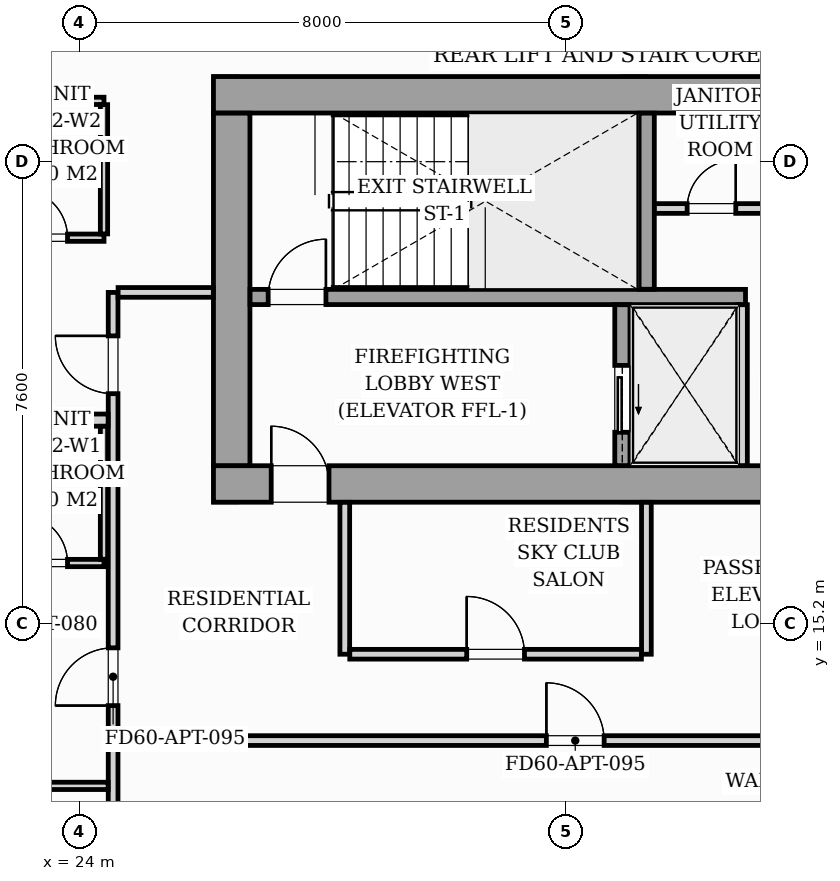
"""IFC4 building model, lengths in metres.
Left out: names, types, materials, properties, quantities, classifications, styles, units other than length and angle.
Written with IfcOpenShell. Run it as: python <this file> out.ifc"""

import sys

from ifc_helpers import new_model, si_unit, direction, frame, frame_2d, origin, origin_2d, place, context, subcontext, project, spatial, rectangle, i_section, extrude, source, transform, mapped, element, fill, save


model = new_model("IFC4")
c1 = context("Model", 3, precision=1e-05, world=origin(), true_north=direction((0.0, 1.0)))
c2 = subcontext(c1, "Body", "Model", "MODEL_VIEW")
j1 = project(units=[si_unit("LENGTHUNIT", "METRE"), si_unit("PLANEANGLEUNIT", "RADIAN")], contexts=[c1])
p1 = place(None, origin())
s1 = spatial("IfcSite", under=j1, at=p1, CompositionType="ELEMENT")
p2 = place(p1, origin())
s2 = spatial("IfcBuilding", under=s1, at=p2, CompositionType="ELEMENT")
p3 = place(p2, frame((0.0, 0.0, 249.6)))
s3 = spatial("IfcBuildingStorey", under=s2, at=p3, CompositionType="ELEMENT", Elevation=249.6)
m1 = source(origin(), c2, "Body", "SweptSolid", [
    extrude(i_section(OverallWidth=0.409, OverallDepth=0.425, WebThickness=0.033, FlangeThickness=0.052, FilletRadius=0.018, at=origin_2d()), origin(), (0.0, 0.0, 1.0), 3.296),
])
for number, where, z_axis, x_axis in (
    (1, (26.4, 17.4, 0.002), (0.0, 0.0, 1.0), (1.0, 0.0, 0.0)),
    (2, (33.12, 17.4, 0.002), (0.0, 0.0, 1.0), (1.0, 0.0, 0.0)),
    (3, (26.4, 24.0, 0.002), (0.0, 0.0, 1.0), (1.0, 0.0, 0.0)),
    (4, (33.12, 24.0, 0.002), (0.0, 0.0, 1.0), (1.0, 0.0, 0.0)),
):
    element("IfcColumn", number, at=place(p3, frame(where, z_axis=z_axis, x_axis=x_axis)), inside=s3, PredefinedType="PILASTER", context=c2, shape_type="MappedRepresentation", body=[
        mapped(m1, transform((0.0, 0.0, 0.0), scale=1.0)),
    ])
p4 = place(p3, frame((26.2, 17.5, 0.0), z_axis=(0.0, 0.0, 1.0), x_axis=(1.0, 0.0, 0.0)))
e5 = element("IfcWall", 5, at=p4, inside=s3, PredefinedType="SHEAR", context=c2, shape_type="SweptSolid", body=[
    extrude(rectangle(XDim=19.6, YDim=0.6, at=frame_2d((9.8, 0.0))), origin(), (0.0, 0.0, 1.0), 3.3),
])
p5 = place(p4, frame((0.95, 0.0, 0.0)))
e6 = element("IfcOpeningElement", 6, at=p5, cuts=e5, PredefinedType="OPENING", context=c2, shape_type="SweptSolid", body=[
    extrude(rectangle(XDim=0.95, YDim=2.06, at=frame_2d((0.475, 1.03))), frame((0.0, 0.31, 0.0), z_axis=(0.0, -1.0, 0.0), x_axis=(1.0, 0.0, 0.0)), (0.0, 0.0, 1.0), 0.62),
])
p6 = place(p4, frame((9.38, 0.0, 0.0)))
e7 = element("IfcOpeningElement", 7, at=p6, cuts=e5, PredefinedType="OPENING", context=c2, shape_type="SweptSolid", body=[
    extrude(rectangle(XDim=0.85, YDim=2.0, at=frame_2d((0.425, 1.0))), frame((0.0, 0.31, 0.0), z_axis=(0.0, -1.0, 0.0), x_axis=(1.0, 0.0, 0.0)), (0.0, 0.0, 1.0), 0.62),
])
p7 = place(p4, frame((17.55, 0.0, 0.0)))
e8 = element("IfcOpeningElement", 8, at=p7, cuts=e5, PredefinedType="OPENING", context=c2, shape_type="SweptSolid", body=[
    extrude(rectangle(XDim=0.95, YDim=2.06, at=frame_2d((0.475, 1.03))), frame((0.0, 0.31, 0.0), z_axis=(0.0, -1.0, 0.0), x_axis=(1.0, 0.0, 0.0)), (0.0, 0.0, 1.0), 0.62),
])
p8 = place(p3, frame((26.2, 23.9, 0.0), z_axis=(0.0, 0.0, 1.0), x_axis=(1.0, 0.0, 0.0)))
e9 = element("IfcWall", 9, at=p8, inside=s3, PredefinedType="SHEAR", context=c2, shape_type="SweptSolid", body=[
    extrude(rectangle(XDim=19.6, YDim=0.6, at=frame_2d((9.8, 0.0))), origin(), (0.0, 0.0, 1.0), 3.3),
])
p9 = place(p3, frame((26.5, 17.802, 0.0), z_axis=(0.0, 0.0, 1.0), x_axis=(0.0, 1.0, 0.0)))
e10 = element("IfcWall", 10, at=p9, inside=s3, PredefinedType="SHEAR", context=c2, shape_type="SweptSolid", body=[
    extrude(rectangle(XDim=5.796, YDim=0.6, at=frame_2d((2.898, 0.0))), origin(), (0.0, 0.0, 1.0), 3.3),
])
p10 = place(p3, frame((26.802, 20.575, 0.0), z_axis=(0.0, 0.0, 1.0), x_axis=(1.0, 0.0, 0.0)))
e11 = element("IfcWall", 11, at=p10, inside=s3, PredefinedType="SOLIDWALL", context=c2, shape_type="SweptSolid", body=[
    extrude(rectangle(XDim=8.148, YDim=0.25, at=frame_2d((4.074, 0.0))), origin(), (0.0, 0.0, 1.0), 3.3),
])
p11 = place(p10, frame((0.298, 0.0, 0.0)))
e12 = element("IfcOpeningElement", 12, at=p11, cuts=e11, PredefinedType="OPENING", context=c2, shape_type="SweptSolid", body=[
    extrude(rectangle(XDim=0.95, YDim=2.06, at=frame_2d((0.475, 1.03))), frame((0.0, 0.135, 0.0), z_axis=(0.0, -1.0, 0.0), x_axis=(1.0, 0.0, 0.0)), (0.0, 0.0, 1.0), 0.27),
])
p12 = place(p3, frame((33.325, 20.702, 0.0), z_axis=(0.0, 0.0, 1.0), x_axis=(0.0, 1.0, 0.0)))
e13 = element("IfcWall", 13, at=p12, inside=s3, PredefinedType="SOLIDWALL", context=c2, shape_type="SweptSolid", body=[
    extrude(rectangle(XDim=2.896, YDim=0.25, at=frame_2d((1.448, 0.0))), origin(), (0.0, 0.0, 1.0), 3.3),
])
p13 = place(p3, frame((32.925, 17.802, 0.0), z_axis=(0.0, 0.0, 1.0), x_axis=(0.0, 1.0, 0.0)))
e14 = element("IfcWall", 14, at=p13, inside=s3, PredefinedType="SOLIDWALL", context=c2, shape_type="SweptSolid", body=[
    extrude(rectangle(XDim=2.646, YDim=0.25, at=frame_2d((1.323, 0.0))), origin(), (0.0, 0.0, 1.0), 3.3),
])
p14 = place(p13, frame((0.548, 0.0, 0.0)))
e15 = element("IfcOpeningElement", 15, at=p14, cuts=e14, PredefinedType="OPENING", context=c2, shape_type="SweptSolid", body=[
    extrude(rectangle(XDim=1.1, YDim=2.08, at=frame_2d((0.55, 1.04))), frame((0.0, 0.135, 0.0), z_axis=(0.0, -1.0, 0.0), x_axis=(1.0, 0.0, 0.0)), (0.0, 0.0, 1.0), 0.27),
])
p15 = place(p3, frame((34.9, 17.802, 0.0), z_axis=(0.0, 0.0, 1.0), x_axis=(0.0, 1.0, 0.0)))
e16 = element("IfcWall", 16, at=p15, inside=s3, PredefinedType="PARTITIONING", context=c2, shape_type="SweptSolid", body=[
    extrude(rectangle(XDim=2.646, YDim=0.16, at=frame_2d((1.323, 0.0))), origin(), (0.0, 0.0, 1.0), 3.04),
])
p16 = place(p3, frame((33.452, 22.03, 0.0), z_axis=(0.0, 0.0, 1.0), x_axis=(1.0, 0.0, 0.0)))
e17 = element("IfcWall", 17, at=p16, inside=s3, PredefinedType="PARTITIONING", context=c2, shape_type="SweptSolid", body=[
    extrude(rectangle(XDim=5.096, YDim=0.16, at=frame_2d((2.548, 0.0))), origin(), (0.0, 0.0, 1.0), 3.04),
])
p17 = place(p16, frame((0.538, 0.0, 0.0)))
e18 = element("IfcOpeningElement", 18, at=p17, cuts=e17, PredefinedType="OPENING", context=c2, shape_type="SweptSolid", body=[
    extrude(rectangle(XDim=0.8, YDim=2.05, at=frame_2d((0.4, 1.025))), frame((0.0, 0.09, 0.0), z_axis=(0.0, -1.0, 0.0), x_axis=(1.0, 0.0, 0.0)), (0.0, 0.0, 1.0), 0.18),
])
p18 = place(p16, frame((3.158, 0.0, 0.0)))
e19 = element("IfcOpeningElement", 19, at=p18, cuts=e17, PredefinedType="OPENING", context=c2, shape_type="SweptSolid", body=[
    extrude(rectangle(XDim=0.8, YDim=2.05, at=frame_2d((0.4, 1.025))), frame((0.0, 0.09, 0.0), z_axis=(0.0, -1.0, 0.0), x_axis=(1.0, 0.0, 0.0)), (0.0, 0.0, 1.0), 0.18),
])
p19 = place(p3, frame((24.55, 13.28, 0.0), z_axis=(0.0, 0.0, 1.0), x_axis=(1.0, 0.0, 0.0)))
e20 = element("IfcWall", 20, at=p19, inside=s3, PredefinedType="PARTITIONING", context=c2, shape_type="SweptSolid", body=[
    extrude(rectangle(XDim=22.9, YDim=0.16, at=frame_2d((11.45, 0.0))), origin(), (0.0, 0.0, 1.0), 2.596),
])
p20 = place(p19, frame((7.125, 0.0, 0.0)))
e21 = element("IfcOpeningElement", 21, at=p20, cuts=e20, PredefinedType="OPENING", context=c2, shape_type="SweptSolid", body=[
    extrude(rectangle(XDim=0.95, YDim=2.06, at=frame_2d((0.475, 1.03))), frame((0.0, 0.09, 0.0), z_axis=(0.0, -1.0, 0.0), x_axis=(1.0, 0.0, 0.0)), (0.0, 0.0, 1.0), 0.18),
])
p21 = place(p3, frame((24.55, 10.077, 0.0), z_axis=(0.0, 0.0, 1.0), x_axis=(0.0, 1.0, 0.0)))
e22 = element("IfcWall", 22, at=p21, inside=s3, PredefinedType="PARTITIONING", context=c2, shape_type="SweptSolid", body=[
    extrude(rectangle(XDim=3.121, YDim=0.16, at=frame_2d((1.561, 0.0))), origin(), (0.0, 0.0, 1.0), 3.04),
])
p22 = place(p3, frame((24.55, 13.362, 0.0), z_axis=(0.0, 0.0, 1.0), x_axis=(0.0, 1.0, 0.0)))
e23 = element("IfcWall", 23, at=p22, inside=s3, PredefinedType="PARTITIONING", context=c2, shape_type="SweptSolid", body=[
    extrude(rectangle(XDim=7.288, YDim=0.16, at=frame_2d((3.644, 0.0))), origin(), (0.0, 0.0, 1.0), 3.04),
])
p23 = place(p22, frame((0.493, 0.0, 0.0)))
e24 = element("IfcOpeningElement", 24, at=p23, cuts=e23, PredefinedType="OPENING", context=c2, shape_type="SweptSolid", body=[
    extrude(rectangle(XDim=0.95, YDim=2.06, at=frame_2d((0.475, 1.03))), frame((0.0, 0.09, 0.0), z_axis=(0.0, -1.0, 0.0), x_axis=(1.0, 0.0, 0.0)), (0.0, 0.0, 1.0), 0.18),
])
p24 = place(p22, frame((5.623, 0.0, 0.0)))
e25 = element("IfcOpeningElement", 25, at=p24, cuts=e23, PredefinedType="OPENING", context=c2, shape_type="SweptSolid", body=[
    extrude(rectangle(XDim=0.95, YDim=2.06, at=frame_2d((0.475, 1.03))), frame((0.0, 0.09, 0.0), z_axis=(0.0, -1.0, 0.0), x_axis=(1.0, 0.0, 0.0)), (0.0, 0.0, 1.0), 0.18),
])
p25 = place(p3, frame((24.632, 20.65, 0.0), z_axis=(0.0, 0.0, 1.0), x_axis=(1.0, 0.0, 0.0)))
e26 = element("IfcWall", 26, at=p25, inside=s3, PredefinedType="PARTITIONING", context=c2, shape_type="SweptSolid", body=[
    extrude(rectangle(XDim=1.566, YDim=0.16, at=frame_2d((0.783, 0.0))), origin(), (0.0, 0.0, 1.0), 3.04),
])
p26 = place(p3, frame((9.434, 18.55, 0.0), z_axis=(0.0, 0.0, 1.0), x_axis=(1.0, 0.0, 0.0)))
e27 = element("IfcWall", 27, at=p26, inside=s3, PredefinedType="PARTITIONING", context=c2, shape_type="SweptSolid", body=[
    extrude(rectangle(XDim=15.034, YDim=0.2, at=frame_2d((7.517, 0.0))), origin(), (0.0, 0.0, 1.0), 2.381),
])
p27 = place(p3, frame((20.2, 16.2, 0.0), z_axis=(0.0, 0.0, 1.0), x_axis=(1.0, 0.0, 0.0)))
e28 = element("IfcWall", 28, at=p27, inside=s3, PredefinedType="PARTITIONING", context=c2, shape_type="SweptSolid", body=[
    extrude(rectangle(XDim=4.2, YDim=0.12, at=frame_2d((2.1, 0.0))), origin(), (0.0, 0.0, 1.0), 3.04),
])
p28 = place(p27, frame((0.675, 0.0, 0.0)))
e29 = element("IfcOpeningElement", 29, at=p28, cuts=e28, PredefinedType="OPENING", context=c2, shape_type="SweptSolid", body=[
    extrude(rectangle(XDim=0.85, YDim=2.05, at=frame_2d((0.425, 1.025))), frame((0.0, 0.07, 0.0), z_axis=(0.0, -1.0, 0.0), x_axis=(1.0, 0.0, 0.0)), (0.0, 0.0, 1.0), 0.14),
])
p29 = place(p27, frame((2.8, 0.0, 0.0)))
e30 = element("IfcOpeningElement", 30, at=p29, cuts=e28, PredefinedType="OPENING", context=c2, shape_type="SweptSolid", body=[
    extrude(rectangle(XDim=0.8, YDim=2.02, at=frame_2d((0.4, 1.01))), frame((0.0, 0.07, 0.0), z_axis=(0.0, -1.0, 0.0), x_axis=(1.0, 0.0, 0.0)), (0.0, 0.0, 1.0), 0.14),
])
p30 = place(p3, frame((24.4, 16.262, 0.0), z_axis=(0.0, 0.0, 1.0), x_axis=(0.0, 1.0, 0.0)))
e31 = element("IfcWall", 31, at=p30, inside=s3, PredefinedType="PARTITIONING", context=c2, shape_type="SweptSolid", body=[
    extrude(rectangle(XDim=2.186, YDim=0.12, at=frame_2d((1.093, 0.0))), origin(), (0.0, 0.0, 1.0), 3.04),
])
p31 = place(p3, frame((13.643, 12.535, 0.0), z_axis=(0.0, 0.0, 1.0), x_axis=(1.0, 0.0, 0.0)))
e32 = element("IfcWall", 32, at=p31, inside=s3, PredefinedType="PARTITIONING", context=c2, shape_type="SweptSolid", body=[
    extrude(rectangle(XDim=10.825, YDim=0.12, at=frame_2d((5.413, 0.0))), origin(), (0.0, 0.0, 1.0), 3.04),
])
p32 = place(p31, frame((4.988, 0.0, 0.0)))
e33 = element("IfcOpeningElement", 33, at=p32, cuts=e32, PredefinedType="OPENING", context=c2, shape_type="SweptSolid", body=[
    extrude(rectangle(XDim=0.85, YDim=2.05, at=frame_2d((0.425, 1.025))), frame((0.0, 0.07, 0.0), z_axis=(0.0, -1.0, 0.0), x_axis=(1.0, 0.0, 0.0)), (0.0, 0.0, 1.0), 0.14),
])
p33 = place(p3, frame((20.2, 21.55, 0.0), z_axis=(0.0, 0.0, 1.0), x_axis=(1.0, 0.0, 0.0)))
e34 = element("IfcWall", 34, at=p33, inside=s3, PredefinedType="PARTITIONING", context=c2, shape_type="SweptSolid", body=[
    extrude(rectangle(XDim=4.2, YDim=0.12, at=frame_2d((2.1, 0.0))), origin(), (0.0, 0.0, 1.0), 3.04),
])
p34 = place(p33, frame((0.675, 0.0, 0.0)))
e35 = element("IfcOpeningElement", 35, at=p34, cuts=e34, PredefinedType="OPENING", context=c2, shape_type="SweptSolid", body=[
    extrude(rectangle(XDim=0.85, YDim=2.05, at=frame_2d((0.425, 1.025))), frame((0.0, 0.07, 0.0), z_axis=(0.0, -1.0, 0.0), x_axis=(1.0, 0.0, 0.0)), (0.0, 0.0, 1.0), 0.14),
])
p35 = place(p33, frame((2.8, 0.0, 0.0)))
e36 = element("IfcOpeningElement", 36, at=p35, cuts=e34, PredefinedType="OPENING", context=c2, shape_type="SweptSolid", body=[
    extrude(rectangle(XDim=0.8, YDim=2.02, at=frame_2d((0.4, 1.01))), frame((0.0, 0.07, 0.0), z_axis=(0.0, -1.0, 0.0), x_axis=(1.0, 0.0, 0.0)), (0.0, 0.0, 1.0), 0.14),
])
p36 = place(p3, frame((20.2, 23.8, 0.0), z_axis=(0.0, 0.0, 1.0), x_axis=(1.0, 0.0, 0.0)))
e37 = element("IfcWall", 37, at=p36, inside=s3, PredefinedType="PARTITIONING", context=c2, shape_type="SweptSolid", body=[
    extrude(rectangle(XDim=4.2, YDim=0.12, at=frame_2d((2.1, 0.0))), origin(), (0.0, 0.0, 1.0), 3.04),
])
p37 = place(p3, frame((24.4, 21.612, 0.0), z_axis=(0.0, 0.0, 1.0), x_axis=(0.0, 1.0, 0.0)))
e38 = element("IfcWall", 38, at=p37, inside=s3, PredefinedType="PARTITIONING", context=c2, shape_type="SweptSolid", body=[
    extrude(rectangle(XDim=2.126, YDim=0.12, at=frame_2d((1.063, 0.0))), origin(), (0.0, 0.0, 1.0), 3.04),
])
for number, where, z_axis, x_axis in (
    (39, (28.36, 14.7, 0.0), (0.0, 0.0, 1.0), (0.0, 1.0, 0.0)),
    (40, (33.32, 14.7, 0.0), (0.0, 0.0, 1.0), (0.0, 1.0, 0.0)),
):
    element("IfcWall", number, at=place(p3, frame(where, z_axis=z_axis, x_axis=x_axis)), inside=s3, PredefinedType="PARTITIONING", context=c2, shape_type="SweptSolid", body=[
        extrude(rectangle(XDim=2.498, YDim=0.16, at=frame_2d((1.249, 0.0))), origin(), (0.0, 0.0, 1.0), 3.04),
    ])
p38 = place(p3, frame((28.442, 14.7, 0.0), z_axis=(0.0, 0.0, 1.0), x_axis=(1.0, 0.0, 0.0)))
e41 = element("IfcWall", 41, at=p38, inside=s3, PredefinedType="PARTITIONING", context=c2, shape_type="SweptSolid", body=[
    extrude(rectangle(XDim=4.796, YDim=0.16, at=frame_2d((2.398, 0.0))), origin(), (0.0, 0.0, 1.0), 2.596),
])
p39 = place(p38, frame((1.923, 0.0, 0.0)))
e42 = element("IfcOpeningElement", 42, at=p39, cuts=e41, PredefinedType="OPENING", context=c2, shape_type="SweptSolid", body=[
    extrude(rectangle(XDim=0.95, YDim=2.06, at=frame_2d((0.475, 1.03))), frame((0.0, 0.09, 0.0), z_axis=(0.0, -1.0, 0.0), x_axis=(1.0, 0.0, 0.0)), (0.0, 0.0, 1.0), 0.18),
])
m2 = source(origin(), c2, "Body", "SweptSolid", [
    extrude(rectangle(XDim=0.95, YDim=2.06, at=frame_2d((0.475, 1.03))), frame((0.0, 0.025, 0.0), z_axis=(0.0, -1.0, 0.0), x_axis=(1.0, 0.0, 0.0)), (0.0, 0.0, 1.0), 0.05),
])
p40 = place(p5, origin())
e43 = element("IfcDoor", 43, at=p40, inside=s3, OperationType="SINGLE_SWING_LEFT", PredefinedType="DOOR", context=c2, shape_type="MappedRepresentation", body=[
    mapped(m2, transform((0.0, 0.0, 0.0), scale=1.0)),
])
fill(e6, e43)
p41 = place(p11, origin())
e44 = element("IfcDoor", 44, at=p41, inside=s3, OperationType="SINGLE_SWING_RIGHT", PredefinedType="DOOR", context=c2, shape_type="MappedRepresentation", body=[
    mapped(m2, transform((0.0, 0.0, 0.0), scale=1.0)),
])
fill(e12, e44)
m3 = source(origin(), c2, "Body", "SweptSolid", [
    extrude(rectangle(XDim=1.1, YDim=2.08, at=frame_2d((0.55, 1.04))), frame((0.0, 0.025, 0.0), z_axis=(0.0, -1.0, 0.0), x_axis=(1.0, 0.0, 0.0)), (0.0, 0.0, 1.0), 0.05),
])
p42 = place(p14, origin())
e45 = element("IfcDoor", 45, at=p42, inside=s3, OperationType="SLIDING_TO_LEFT", PredefinedType="DOOR", context=c2, shape_type="MappedRepresentation", body=[
    mapped(m3, transform((0.0, 0.0, 0.0), scale=1.0)),
])
fill(e15, e45)
m4 = source(origin(), c2, "Body", "SweptSolid", [
    extrude(rectangle(XDim=0.8, YDim=2.05, at=frame_2d((0.4, 1.025))), frame((0.0, 0.025, 0.0), z_axis=(0.0, -1.0, 0.0), x_axis=(1.0, 0.0, 0.0)), (0.0, 0.0, 1.0), 0.05),
])
p43 = place(p17, origin())
e46 = element("IfcDoor", 46, at=p43, inside=s3, OperationType="SINGLE_SWING_RIGHT", PredefinedType="DOOR", context=c2, shape_type="MappedRepresentation", body=[
    mapped(m4, transform((0.0, 0.0, 0.0), scale=1.0)),
])
fill(e18, e46)
m5 = source(origin(), c2, "Body", "SweptSolid", [
    extrude(rectangle(XDim=0.95, YDim=2.06, at=frame_2d((0.475, 1.03))), frame((0.0, 0.025, 0.0), z_axis=(0.0, -1.0, 0.0), x_axis=(1.0, 0.0, 0.0)), (0.0, 0.0, 1.0), 0.05),
])
p44 = place(p20, origin())
e47 = element("IfcDoor", 47, at=p44, inside=s3, OperationType="SINGLE_SWING_LEFT", PredefinedType="DOOR", context=c2, shape_type="MappedRepresentation", body=[
    mapped(m5, transform((0.0, 0.0, 0.0), scale=1.0)),
])
fill(e21, e47)
p45 = place(p23, origin())
e48 = element("IfcDoor", 48, at=p45, inside=s3, OperationType="SINGLE_SWING_LEFT", PredefinedType="DOOR", context=c2, shape_type="MappedRepresentation", body=[
    mapped(m5, transform((0.0, 0.0, 0.0), scale=1.0)),
])
fill(e24, e48)
m6 = source(origin(), c2, "Body", "SweptSolid", [
    extrude(rectangle(XDim=0.8, YDim=2.02, at=frame_2d((0.4, 1.01))), frame((0.0, 0.025, 0.0), z_axis=(0.0, -1.0, 0.0), x_axis=(1.0, 0.0, 0.0)), (0.0, 0.0, 1.0), 0.05),
])
p46 = place(p29, origin())
e49 = element("IfcDoor", 49, at=p46, inside=s3, OperationType="SINGLE_SWING_LEFT", PredefinedType="DOOR", context=c2, shape_type="MappedRepresentation", body=[
    mapped(m6, transform((0.0, 0.0, 0.0), scale=1.0)),
])
fill(e30, e49)
p47 = place(p24, origin())
e50 = element("IfcDoor", 50, at=p47, inside=s3, OperationType="SINGLE_SWING_RIGHT", PredefinedType="DOOR", context=c2, shape_type="MappedRepresentation", body=[
    mapped(m5, transform((0.0, 0.0, 0.0), scale=1.0)),
])
fill(e25, e50)
p48 = place(p35, origin())
e51 = element("IfcDoor", 51, at=p48, inside=s3, OperationType="SINGLE_SWING_LEFT", PredefinedType="DOOR", context=c2, shape_type="MappedRepresentation", body=[
    mapped(m6, transform((0.0, 0.0, 0.0), scale=1.0)),
])
fill(e36, e51)
p49 = place(p39, origin())
e52 = element("IfcDoor", 52, at=p49, inside=s3, OperationType="SINGLE_SWING_LEFT", PredefinedType="DOOR", context=c2, shape_type="MappedRepresentation", body=[
    mapped(m5, transform((0.0, 0.0, 0.0), scale=1.0)),
])
fill(e42, e52)
save(model, sys.argv[1])
